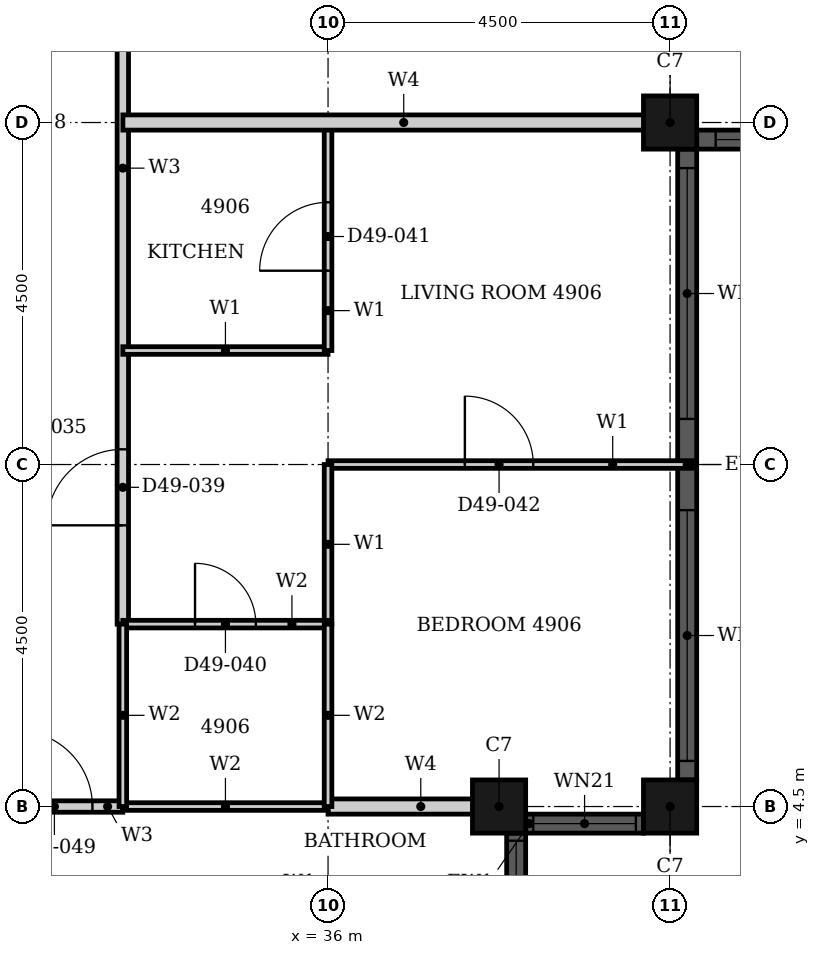
"""IFC4 building model, lengths in metres.
Left out: names, types, materials, properties, quantities, classifications, styles, units other than length and angle.
Written with IfcOpenShell. Run it as: python <this file> out.ifc"""

import sys

from ifc_helpers import new_model, si_unit, direction, frame, frame_2d, origin, origin_2d, place, context, subcontext, project, spatial, rectangle, hollow_rectangle, extrude, element, fill, save


model = new_model("IFC4")
c1 = context("Model", 3, precision=1e-05, world=origin(), true_north=direction((0.0, 1.0)))
c2 = subcontext(c1, "Body", "Model", "MODEL_VIEW")
j1 = project(units=[si_unit("LENGTHUNIT", "METRE"), si_unit("PLANEANGLEUNIT", "RADIAN")], contexts=[c1])
p1 = place(None, origin())
s1 = spatial("IfcSite", under=j1, at=p1, CompositionType="ELEMENT")
p2 = place(p1, origin())
s2 = spatial("IfcBuilding", under=s1, at=p2, CompositionType="ELEMENT")
p3 = place(p2, frame((0.0, 0.0, 196.1)))
s3 = spatial("IfcBuildingStorey", under=s2, at=p3, CompositionType="ELEMENT", Elevation=196.1)
for number, where, z_axis, x_axis in (
    (1, (40.5, 13.5, 0.0), (0.0, 0.0, 1.0), (1.0, 0.0, 0.0)),
    (2, (38.25, 4.5, 0.0), (0.0, 0.0, 1.0), (1.0, 0.0, 0.0)),
    (3, (40.5, 4.5, 0.0), (0.0, 0.0, 1.0), (1.0, 0.0, 0.0)),
):
    element("IfcColumn", number, at=place(p3, frame(where, z_axis=z_axis, x_axis=x_axis)), inside=s3, PredefinedType="COLUMN", context=c2, shape_type="SweptSolid", body=[
        extrude(hollow_rectangle(XDim=0.7, YDim=0.7, WallThickness=0.022, at=origin_2d()), origin(), (0.0, 0.0, 1.0), 3.7),
    ])
p4 = place(p3, frame((40.85, 13.275, 0.0), z_axis=(0.0, 0.0, 1.0), x_axis=(1.0, 0.0, 0.0)))
e4 = element("IfcWall", 4, at=p4, inside=s3, PredefinedType="SOLIDWALL", context=c2, shape_type="SweptSolid", body=[
    extrude(rectangle(XDim=3.8, YDim=0.25, at=frame_2d((1.9, 0.0))), origin(), (0.0, 0.0, 1.0), 3.7),
])
p5 = place(p4, frame((0.25, 0.0, 0.45)))
e5 = element("IfcOpeningElement", 5, at=p5, cuts=e4, PredefinedType="OPENING", context=c2, shape_type="SweptSolid", body=[
    extrude(rectangle(XDim=3.3, YDim=2.3, at=frame_2d((1.65, 1.15))), frame((0.0, 0.135, 0.0), z_axis=(0.0, -1.0, 0.0), x_axis=(1.0, 0.0, 0.0)), (0.0, 0.0, 1.0), 0.27),
])
p6 = place(p3, frame((38.475, 2.6, 0.0), z_axis=(0.0, 0.0, 1.0), x_axis=(0.0, 1.0, 0.0)))
e6 = element("IfcWall", 6, at=p6, inside=s3, PredefinedType="SOLIDWALL", context=c2, shape_type="SweptSolid", body=[
    extrude(rectangle(XDim=1.55, YDim=0.25, at=frame_2d((0.775, 0.0))), origin(), (0.0, 0.0, 1.0), 3.7),
])
p7 = place(p6, frame((0.1, 0.0, 0.9)))
e7 = element("IfcOpeningElement", 7, at=p7, cuts=e6, PredefinedType="OPENING", context=c2, shape_type="SweptSolid", body=[
    extrude(rectangle(XDim=1.35, YDim=1.85, at=frame_2d((0.675, 0.925))), frame((0.0, 0.135, 0.0), z_axis=(0.0, -1.0, 0.0), x_axis=(1.0, 0.0, 0.0)), (0.0, 0.0, 1.0), 0.27),
])
p8 = place(p3, frame((38.6, 4.275, 0.0), z_axis=(0.0, 0.0, 1.0), x_axis=(1.0, 0.0, 0.0)))
e8 = element("IfcWall", 8, at=p8, inside=s3, PredefinedType="SOLIDWALL", context=c2, shape_type="SweptSolid", body=[
    extrude(rectangle(XDim=1.55, YDim=0.25, at=frame_2d((0.775, 0.0))), origin(), (0.0, 0.0, 1.0), 3.7),
])
p9 = place(p8, frame((0.1, 0.0, 0.9)))
e9 = element("IfcOpeningElement", 9, at=p9, cuts=e8, PredefinedType="OPENING", context=c2, shape_type="SweptSolid", body=[
    extrude(rectangle(XDim=1.35, YDim=1.85, at=frame_2d((0.675, 0.925))), frame((0.0, 0.135, 0.0), z_axis=(0.0, -1.0, 0.0), x_axis=(1.0, 0.0, 0.0)), (0.0, 0.0, 1.0), 0.27),
])
p10 = place(p3, frame((40.725, 4.85, 0.0), z_axis=(0.0, 0.0, 1.0), x_axis=(0.0, 1.0, 0.0)))
e10 = element("IfcWall", 10, at=p10, inside=s3, PredefinedType="SOLIDWALL", context=c2, shape_type="SweptSolid", body=[
    extrude(rectangle(XDim=8.3, YDim=0.25, at=frame_2d((4.15, 0.0))), origin(), (0.0, 0.0, 1.0), 3.7),
])
p11 = place(p10, frame((0.25, 0.0, 0.45)))
e11 = element("IfcOpeningElement", 11, at=p11, cuts=e10, PredefinedType="OPENING", context=c2, shape_type="SweptSolid", body=[
    extrude(rectangle(XDim=3.3, YDim=2.3, at=frame_2d((1.65, 1.15))), frame((0.0, 0.135, 0.0), z_axis=(0.0, -1.0, 0.0), x_axis=(1.0, 0.0, 0.0)), (0.0, 0.0, 1.0), 0.27),
])
p12 = place(p10, frame((4.75, 0.0, 0.45)))
e12 = element("IfcOpeningElement", 12, at=p12, cuts=e10, PredefinedType="OPENING", context=c2, shape_type="SweptSolid", body=[
    extrude(rectangle(XDim=3.3, YDim=2.3, at=frame_2d((1.65, 1.15))), frame((0.0, 0.135, 0.0), z_axis=(0.0, -1.0, 0.0), x_axis=(1.0, 0.0, 0.0)), (0.0, 0.0, 1.0), 0.27),
])
p13 = place(p3, frame((31.5, 4.5, 0.0), z_axis=(0.0, 0.0, 1.0), x_axis=(1.0, 0.0, 0.0)))
e13 = element("IfcWall", 13, at=p13, inside=s3, PredefinedType="PARTITIONING", context=c2, shape_type="SweptSolid", body=[
    extrude(rectangle(XDim=1.8, YDim=0.15, at=frame_2d((0.9, 0.0))), origin(), (0.0, 0.0, 1.0), 3.4),
])
p14 = place(p13, frame((0.4, 0.0, 0.0)))
e14 = element("IfcOpeningElement", 14, at=p14, cuts=e13, PredefinedType="OPENING", context=c2, shape_type="SweptSolid", body=[
    extrude(rectangle(XDim=1.0, YDim=2.2, at=frame_2d((0.5, 1.1))), frame((0.0, 0.085, 0.0), z_axis=(0.0, -1.0, 0.0), x_axis=(1.0, 0.0, 0.0)), (0.0, 0.0, 1.0), 0.17),
])
p15 = place(p3, frame((33.3, 6.9, 0.0), z_axis=(0.0, 0.0, 1.0), x_axis=(0.0, 1.0, 0.0)))
e15 = element("IfcWall", 15, at=p15, inside=s3, PredefinedType="PARTITIONING", context=c2, shape_type="SweptSolid", body=[
    extrude(rectangle(XDim=13.799, YDim=0.15, at=frame_2d((6.899, 0.0))), origin(), (0.0, 0.0, 1.0), 3.4),
])
p16 = place(p15, frame((9.699, 0.0, 0.0)))
e16 = element("IfcOpeningElement", 16, at=p16, cuts=e15, PredefinedType="OPENING", context=c2, shape_type="SweptSolid", body=[
    extrude(rectangle(XDim=1.0, YDim=2.2, at=frame_2d((0.5, 1.1))), frame((0.0, 0.085, 0.0), z_axis=(0.0, -1.0, 0.0), x_axis=(1.0, 0.0, 0.0)), (0.0, 0.0, 1.0), 0.17),
])
p17 = place(p15, frame((1.3, 0.0, 0.0)))
e17 = element("IfcOpeningElement", 17, at=p17, cuts=e15, PredefinedType="OPENING", context=c2, shape_type="SweptSolid", body=[
    extrude(rectangle(XDim=1.0, YDim=2.2, at=frame_2d((0.5, 1.1))), frame((0.0, 0.085, 0.0), z_axis=(0.0, -1.0, 0.0), x_axis=(1.0, 0.0, 0.0)), (0.0, 0.0, 1.0), 0.17),
])
p18 = place(p3, frame((33.3, 10.5, 0.0), z_axis=(0.0, 0.0, 1.0), x_axis=(1.0, 0.0, 0.0)))
e18 = element("IfcWall", 18, at=p18, inside=s3, PredefinedType="PARTITIONING", context=c2, shape_type="SweptSolid", body=[
    extrude(rectangle(XDim=2.7, YDim=0.1, at=frame_2d((1.35, 0.0))), origin(), (0.0, 0.0, 1.0), 3.4),
])
p19 = place(p3, frame((36.0, 9.0, 0.0), z_axis=(0.0, 0.0, 1.0), x_axis=(1.0, 0.0, 0.0)))
e19 = element("IfcWall", 19, at=p19, inside=s3, PredefinedType="PARTITIONING", context=c2, shape_type="SweptSolid", body=[
    extrude(rectangle(XDim=4.79, YDim=0.1, at=frame_2d((2.395, 0.0))), origin(), (0.0, 0.0, 1.0), 3.4),
])
p20 = place(p19, frame((1.8, 0.0, 0.0)))
e20 = element("IfcOpeningElement", 20, at=p20, cuts=e19, PredefinedType="OPENING", context=c2, shape_type="SweptSolid", body=[
    extrude(rectangle(XDim=0.9, YDim=2.1, at=frame_2d((0.45, 1.05))), frame((0.0, 0.06, 0.0), z_axis=(0.0, -1.0, 0.0), x_axis=(1.0, 0.0, 0.0)), (0.0, 0.0, 1.0), 0.12),
])
p21 = place(p3, frame((36.0, 6.9, 0.0), z_axis=(0.0, 0.0, 1.0), x_axis=(0.0, 1.0, 0.0)))
e21 = element("IfcWall", 21, at=p21, inside=s3, PredefinedType="PARTITIONING", context=c2, shape_type="SweptSolid", body=[
    extrude(rectangle(XDim=2.1, YDim=0.1, at=frame_2d((1.05, 0.0))), origin(), (0.0, 0.0, 1.0), 2.68),
])
p22 = place(p3, frame((36.0, 10.5, 0.0), z_axis=(0.0, 0.0, 1.0), x_axis=(0.0, 1.0, 0.0)))
e22 = element("IfcWall", 22, at=p22, inside=s3, PredefinedType="PARTITIONING", context=c2, shape_type="SweptSolid", body=[
    extrude(rectangle(XDim=3.0, YDim=0.1, at=frame_2d((1.5, 0.0))), origin(), (0.0, 0.0, 1.0), 2.68),
])
p23 = place(p22, frame((1.05, 0.0, 0.0)))
e23 = element("IfcOpeningElement", 23, at=p23, cuts=e22, PredefinedType="OPENING", context=c2, shape_type="SweptSolid", body=[
    extrude(rectangle(XDim=0.9, YDim=2.1, at=frame_2d((0.45, 1.05))), frame((0.0, 0.06, 0.0), z_axis=(0.0, -1.0, 0.0), x_axis=(1.0, 0.0, 0.0)), (0.0, 0.0, 1.0), 0.12),
])
p24 = place(p3, frame((33.301, 13.5, 0.0), z_axis=(0.0, 0.0, 1.0), x_axis=(1.0, 0.0, 0.0)))
e24 = element("IfcWall", 24, at=p24, inside=s3, PredefinedType="PARTITIONING", context=c2, shape_type="SweptSolid", body=[
    extrude(rectangle(XDim=7.389, YDim=0.2, at=frame_2d((3.694, 0.0))), origin(), (0.0, 0.0, 1.0), 2.48),
])
p25 = place(p3, frame((36.0, 4.5, 0.0), z_axis=(0.0, 0.0, 1.0), x_axis=(1.0, 0.0, 0.0)))
e25 = element("IfcWall", 25, at=p25, inside=s3, PredefinedType="PARTITIONING", context=c2, shape_type="SweptSolid", body=[
    extrude(rectangle(XDim=2.44, YDim=0.2, at=frame_2d((1.22, 0.0))), origin(), (0.0, 0.0, 1.0), 3.4),
])
p26 = place(p3, frame((33.3, 4.5, 0.0), z_axis=(0.0, 0.0, 1.0), x_axis=(1.0, 0.0, 0.0)))
e26 = element("IfcWall", 26, at=p26, inside=s3, PredefinedType="PARTITIONING", context=c2, shape_type="SweptSolid", body=[
    extrude(rectangle(XDim=2.7, YDim=0.1, at=frame_2d((1.35, 0.0))), origin(), (0.0, 0.0, 1.0), 3.4),
])
p27 = place(p3, frame((33.3, 6.9, 0.0), z_axis=(0.0, 0.0, 1.0), x_axis=(1.0, 0.0, 0.0)))
e27 = element("IfcWall", 27, at=p27, inside=s3, PredefinedType="PARTITIONING", context=c2, shape_type="SweptSolid", body=[
    extrude(rectangle(XDim=2.7, YDim=0.1, at=frame_2d((1.35, 0.0))), origin(), (0.0, 0.0, 1.0), 3.4),
])
p28 = place(p27, frame((0.95, 0.0, 0.0)))
e28 = element("IfcOpeningElement", 28, at=p28, cuts=e27, PredefinedType="OPENING", context=c2, shape_type="SweptSolid", body=[
    extrude(rectangle(XDim=0.8, YDim=2.1, at=frame_2d((0.4, 1.05))), frame((0.0, 0.06, 0.0), z_axis=(0.0, -1.0, 0.0), x_axis=(1.0, 0.0, 0.0)), (0.0, 0.0, 1.0), 0.12),
])
p29 = place(p3, frame((33.3, 4.5, 0.0), z_axis=(0.0, 0.0, 1.0), x_axis=(0.0, 1.0, 0.0)))
e29 = element("IfcWall", 29, at=p29, inside=s3, PredefinedType="PARTITIONING", context=c2, shape_type="SweptSolid", body=[
    extrude(rectangle(XDim=2.4, YDim=0.1, at=frame_2d((1.2, 0.0))), origin(), (0.0, 0.0, 1.0), 3.4),
])
p30 = place(p3, frame((36.0, 4.5, 0.0), z_axis=(0.0, 0.0, 1.0), x_axis=(0.0, 1.0, 0.0)))
e30 = element("IfcWall", 30, at=p30, inside=s3, PredefinedType="PARTITIONING", context=c2, shape_type="SweptSolid", body=[
    extrude(rectangle(XDim=2.4, YDim=0.1, at=frame_2d((1.2, 0.0))), origin(), (0.0, 0.0, 1.0), 2.68),
])
p31 = place(p5, origin())
e31 = element("IfcWindow", 31, at=p31, inside=s3, PartitioningType="SINGLE_PANEL", PredefinedType="WINDOW", context=c2, shape_type="SweptSolid", body=[
    extrude(rectangle(XDim=3.3, YDim=2.3, at=frame_2d((1.65, 1.15))), frame((0.0, 0.03, 0.0), z_axis=(0.0, -1.0, 0.0), x_axis=(1.0, 0.0, 0.0)), (0.0, 0.0, 1.0), 0.06),
])
fill(e5, e31)
p32 = place(p7, origin())
e32 = element("IfcWindow", 32, at=p32, inside=s3, PartitioningType="SINGLE_PANEL", PredefinedType="WINDOW", context=c2, shape_type="SweptSolid", body=[
    extrude(rectangle(XDim=1.35, YDim=1.85, at=frame_2d((0.675, 0.925))), frame((0.0, 0.03, 0.0), z_axis=(0.0, -1.0, 0.0), x_axis=(1.0, 0.0, 0.0)), (0.0, 0.0, 1.0), 0.06),
])
fill(e7, e32)
p33 = place(p9, origin())
e33 = element("IfcWindow", 33, at=p33, inside=s3, PartitioningType="SINGLE_PANEL", PredefinedType="WINDOW", context=c2, shape_type="SweptSolid", body=[
    extrude(rectangle(XDim=1.35, YDim=1.85, at=frame_2d((0.675, 0.925))), frame((0.0, 0.03, 0.0), z_axis=(0.0, -1.0, 0.0), x_axis=(1.0, 0.0, 0.0)), (0.0, 0.0, 1.0), 0.06),
])
fill(e9, e33)
p34 = place(p11, origin())
e34 = element("IfcWindow", 34, at=p34, inside=s3, PartitioningType="SINGLE_PANEL", PredefinedType="WINDOW", context=c2, shape_type="SweptSolid", body=[
    extrude(rectangle(XDim=3.3, YDim=2.3, at=frame_2d((1.65, 1.15))), frame((0.0, 0.03, 0.0), z_axis=(0.0, -1.0, 0.0), x_axis=(1.0, 0.0, 0.0)), (0.0, 0.0, 1.0), 0.06),
])
fill(e11, e34)
p35 = place(p12, origin())
e35 = element("IfcWindow", 35, at=p35, inside=s3, PartitioningType="SINGLE_PANEL", PredefinedType="WINDOW", context=c2, shape_type="SweptSolid", body=[
    extrude(rectangle(XDim=3.3, YDim=2.3, at=frame_2d((1.65, 1.15))), frame((0.0, 0.03, 0.0), z_axis=(0.0, -1.0, 0.0), x_axis=(1.0, 0.0, 0.0)), (0.0, 0.0, 1.0), 0.06),
])
fill(e12, e35)
p36 = place(p17, origin())
e36 = element("IfcDoor", 36, at=p36, inside=s3, OperationType="SINGLE_SWING_LEFT", PredefinedType="DOOR", context=c2, shape_type="SweptSolid", body=[
    extrude(rectangle(XDim=1.0, YDim=2.2, at=frame_2d((0.5, 1.1))), frame((0.0, 0.025, 0.0), z_axis=(0.0, -1.0, 0.0), x_axis=(1.0, 0.0, 0.0)), (0.0, 0.0, 1.0), 0.05),
])
fill(e17, e36)
p37 = place(p28, origin())
e37 = element("IfcDoor", 37, at=p37, inside=s3, OperationType="SINGLE_SWING_LEFT", PredefinedType="DOOR", context=c2, shape_type="SweptSolid", body=[
    extrude(rectangle(XDim=0.8, YDim=2.1, at=frame_2d((0.4, 1.05))), frame((0.0, 0.025, 0.0), z_axis=(0.0, -1.0, 0.0), x_axis=(1.0, 0.0, 0.0)), (0.0, 0.0, 1.0), 0.05),
])
fill(e28, e37)
p38 = place(p23, origin())
e38 = element("IfcDoor", 38, at=p38, inside=s3, OperationType="SINGLE_SWING_RIGHT", PredefinedType="DOOR", context=c2, shape_type="SweptSolid", body=[
    extrude(rectangle(XDim=0.9, YDim=2.1, at=frame_2d((0.45, 1.05))), frame((0.0, 0.025, 0.0), z_axis=(0.0, -1.0, 0.0), x_axis=(1.0, 0.0, 0.0)), (0.0, 0.0, 1.0), 0.05),
])
fill(e23, e38)
p39 = place(p20, origin())
e39 = element("IfcDoor", 39, at=p39, inside=s3, OperationType="SINGLE_SWING_RIGHT", PredefinedType="DOOR", context=c2, shape_type="SweptSolid", body=[
    extrude(rectangle(XDim=0.9, YDim=2.1, at=frame_2d((0.45, 1.05))), frame((0.0, 0.025, 0.0), z_axis=(0.0, -1.0, 0.0), x_axis=(1.0, 0.0, 0.0)), (0.0, 0.0, 1.0), 0.05),
])
fill(e20, e39)
p40 = place(p14, origin())
e40 = element("IfcDoor", 40, at=p40, inside=s3, OperationType="SINGLE_SWING_LEFT", PredefinedType="DOOR", context=c2, shape_type="SweptSolid", body=[
    extrude(rectangle(XDim=1.0, YDim=2.2, at=frame_2d((0.5, 1.1))), frame((0.0, 0.025, 0.0), z_axis=(0.0, -1.0, 0.0), x_axis=(1.0, 0.0, 0.0)), (0.0, 0.0, 1.0), 0.05),
])
fill(e14, e40)
save(model, sys.argv[1])
